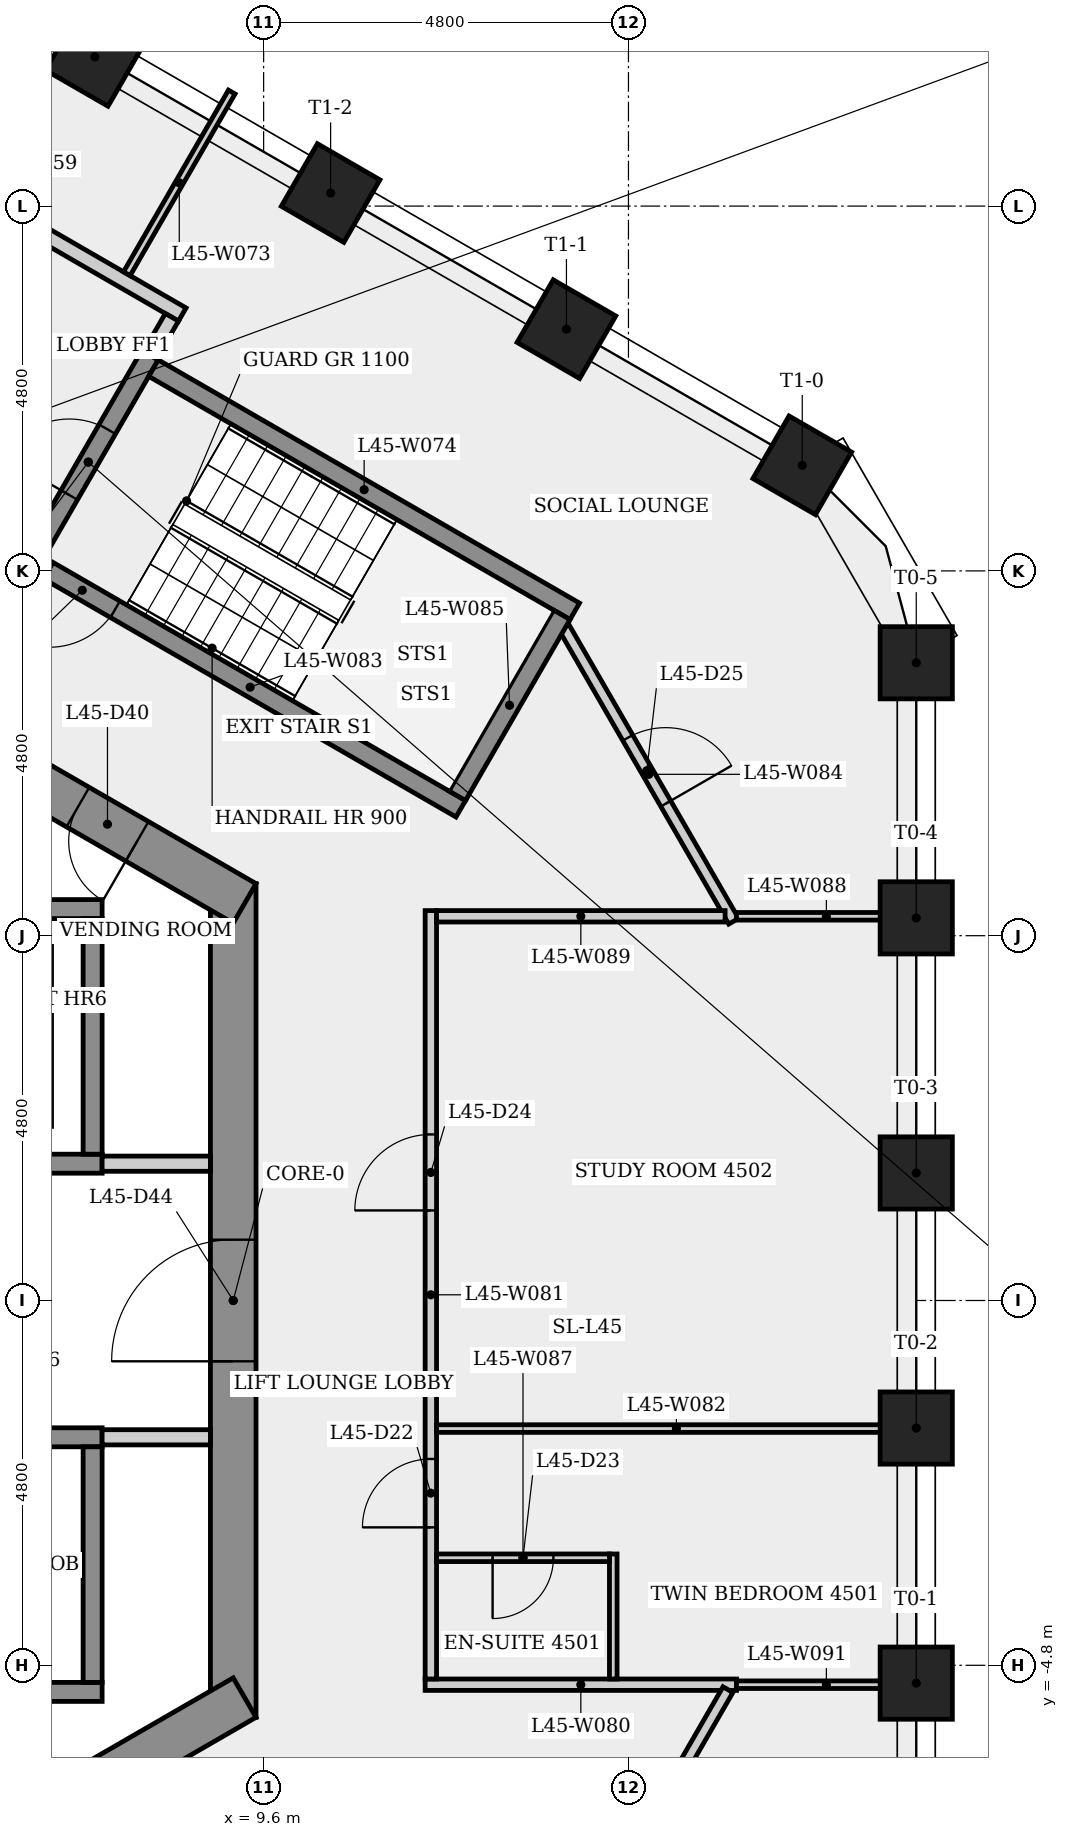
"""IFC4 building model, lengths in metres.
Left out: names, types, materials, properties, quantities, classifications, styles, units other than length and angle.
Written with IfcOpenShell. Run it as: python <this file> out.ifc"""

import sys

from ifc_helpers import new_model, si_unit, direction, frame, frame_2d, origin, origin_2d, place, context, subcontext, project, spatial, rectangle, extrude, element, fill, save


model = new_model("IFC4")
c1 = context("Model", 3, precision=1e-05, world=origin(), true_north=direction((0.0, 1.0)))
c2 = subcontext(c1, "Body", "Model", "MODEL_VIEW")
j1 = project(units=[si_unit("LENGTHUNIT", "METRE"), si_unit("PLANEANGLEUNIT", "RADIAN")], contexts=[c1])
p1 = place(None, origin())
s1 = spatial("IfcSite", under=j1, at=p1, CompositionType="ELEMENT")
p2 = place(p1, origin())
s2 = spatial("IfcBuilding", under=s1, at=p2, CompositionType="ELEMENT")
p3 = place(p2, frame((0.0, 0.0, 169.7)))
s3 = spatial("IfcBuildingStorey", under=s2, at=p3, CompositionType="ELEMENT", Elevation=169.7)
p4 = place(p3, frame((9.2, -5.485, 0.0), z_axis=(0.0, 0.0, 1.0), x_axis=(0.0, 1.0, 0.0)))
e1 = element("IfcWall", 1, at=p4, inside=s3, PredefinedType="SHEAR", context=c2, shape_type="SweptSolid", body=[
    extrude(rectangle(XDim=10.97, YDim=0.6, at=frame_2d((5.485, 0.0))), origin(), (0.0, 0.0, 1.0), 3.4),
])
p5 = place(p4, frame((4.685, 0.0, 0.0)))
e2 = element("IfcOpeningElement", 2, at=p5, cuts=e1, PredefinedType="OPENING", context=c2, shape_type="SweptSolid", body=[
    extrude(rectangle(XDim=1.6, YDim=2.1, at=frame_2d((0.8, 1.05))), frame((0.0, 0.31, 0.0), z_axis=(0.0, -1.0, 0.0), x_axis=(1.0, 0.0, 0.0)), (0.0, 0.0, 1.0), 0.62),
])
p6 = place(p3, frame((9.35, 5.225, 0.0), z_axis=(0.0, 0.0, 1.0), x_axis=(-0.866023993627, 0.500002442456, 0.0)))
e3 = element("IfcWall", 3, at=p6, inside=s3, PredefinedType="SHEAR", context=c2, shape_type="SweptSolid", body=[
    extrude(rectangle(XDim=10.97, YDim=0.6, at=frame_2d((5.485, 0.0))), origin(), (0.0, 0.0, 1.0), 3.4),
])
p7 = place(p6, frame((8.442, 0.0, 0.0)))
e4 = element("IfcOpeningElement", 4, at=p7, cuts=e3, PredefinedType="OPENING", context=c2, shape_type="SweptSolid", body=[
    extrude(rectangle(XDim=0.9, YDim=2.1, at=frame_2d((0.45, 1.05))), frame((0.0, 0.31, 0.0), z_axis=(0.0, -1.0, 0.0), x_axis=(1.0, 0.0, 0.0)), (0.0, 0.0, 1.0), 0.62),
])
p8 = place(p6, frame((1.634, 0.0, 0.0)))
e5 = element("IfcOpeningElement", 5, at=p8, cuts=e3, PredefinedType="OPENING", context=c2, shape_type="SweptSolid", body=[
    extrude(rectangle(XDim=0.9, YDim=2.1, at=frame_2d((0.45, 1.05))), frame((0.0, 0.31, 0.0), z_axis=(0.0, -1.0, 0.0), x_axis=(1.0, 0.0, 0.0)), (0.0, 0.0, 1.0), 0.62),
])
p9 = place(p3, frame((-0.15, -10.71, 0.0), z_axis=(0.0, 0.0, 1.0), x_axis=(0.866023993627, 0.500002442456, 0.0)))
e6 = element("IfcWall", 6, at=p9, inside=s3, PredefinedType="SHEAR", context=c2, shape_type="SweptSolid", body=[
    extrude(rectangle(XDim=10.97, YDim=0.6, at=frame_2d((5.485, 0.0))), origin(), (0.0, 0.0, 1.0), 3.4),
])
p10 = place(p9, frame((7.281, 0.0, 0.0)))
e7 = element("IfcOpeningElement", 7, at=p10, cuts=e6, PredefinedType="OPENING", context=c2, shape_type="SweptSolid", body=[
    extrude(rectangle(XDim=0.9, YDim=2.1, at=frame_2d((0.45, 1.05))), frame((0.0, 0.31, 0.0), z_axis=(0.0, -1.0, 0.0), x_axis=(1.0, 0.0, 0.0)), (0.0, 0.0, 1.0), 0.62),
])
for number, where, z_axis, x_axis in (
    (8, (18.187, -5.035, 0.0), (0.0, 0.0, 1.0), (1.0, 0.0, 0.0)),
    (9, (18.187, -1.678, 0.0), (0.0, 0.0, 1.0), (1.0, 0.0, 0.0)),
    (10, (18.187, 1.678, 0.0), (0.0, 0.0, 1.0), (1.0, 0.0, 0.0)),
    (11, (18.187, 5.035, 0.0), (0.0, 0.0, 1.0), (1.0, 0.0, 0.0)),
    (12, (18.187, 8.391, 0.0), (0.0, 0.0, 1.0), (1.0, 0.0, 0.0)),
    (13, (16.687, 10.989, 0.0), (0.0, 0.0, 1.0), (0.5, 0.866, 0.0)),
    (14, (13.584, 12.781, 0.0), (0.0, 0.0, 1.0), (0.5, 0.866, 0.0)),
    (15, (10.481, 14.572, 0.0), (0.0, 0.0, 1.0), (0.5, 0.866, 0.0)),
    (16, (7.379, 16.363, 0.0), (0.0, 0.0, 1.0), (0.5, 0.866, 0.0)),
):
    element("IfcColumn", number, at=place(p3, frame(where, z_axis=z_axis, x_axis=x_axis)), inside=s3, PredefinedType="COLUMN", context=c2, shape_type="SweptSolid", body=[
        extrude(rectangle(XDim=0.95, YDim=0.95, at=origin_2d()), origin(), (0.0, 0.0, 1.0), 3.4),
    ])
p11 = place(p3, frame((-7.475, 1.8, 0.0), z_axis=(0.0, 0.0, 1.0), x_axis=(1.0, 0.0, 0.0)))
e17 = element("IfcWall", 17, at=p11, inside=s3, PredefinedType="SHEAR", context=c2, shape_type="SweptSolid", body=[
    extrude(rectangle(XDim=14.95, YDim=0.25, at=frame_2d((7.475, 0.0))), origin(), (0.0, 0.0, 1.0), 3.05),
])
p12 = place(p11, frame((0.8, 0.0, 0.0)))
e18 = element("IfcOpeningElement", 18, at=p12, cuts=e17, PredefinedType="OPENING", context=c2, shape_type="SweptSolid", body=[
    extrude(rectangle(XDim=1.1, YDim=2.1, at=frame_2d((0.55, 1.05))), frame((0.0, 0.135, 0.0), z_axis=(0.0, -1.0, 0.0), x_axis=(1.0, 0.0, 0.0)), (0.0, 0.0, 1.0), 0.27),
])
p13 = place(p11, frame((3.25, 0.0, 0.0)))
e19 = element("IfcOpeningElement", 19, at=p13, cuts=e17, PredefinedType="OPENING", context=c2, shape_type="SweptSolid", body=[
    extrude(rectangle(XDim=1.1, YDim=2.1, at=frame_2d((0.55, 1.05))), frame((0.0, 0.135, 0.0), z_axis=(0.0, -1.0, 0.0), x_axis=(1.0, 0.0, 0.0)), (0.0, 0.0, 1.0), 0.27),
])
p14 = place(p11, frame((5.7, 0.0, 0.0)))
e20 = element("IfcOpeningElement", 20, at=p14, cuts=e17, PredefinedType="OPENING", context=c2, shape_type="SweptSolid", body=[
    extrude(rectangle(XDim=1.1, YDim=2.1, at=frame_2d((0.55, 1.05))), frame((0.0, 0.135, 0.0), z_axis=(0.0, -1.0, 0.0), x_axis=(1.0, 0.0, 0.0)), (0.0, 0.0, 1.0), 0.27),
])
p15 = place(p11, frame((8.15, 0.0, 0.0)))
e21 = element("IfcOpeningElement", 21, at=p15, cuts=e17, PredefinedType="OPENING", context=c2, shape_type="SweptSolid", body=[
    extrude(rectangle(XDim=1.1, YDim=2.1, at=frame_2d((0.55, 1.05))), frame((0.0, 0.135, 0.0), z_axis=(0.0, -1.0, 0.0), x_axis=(1.0, 0.0, 0.0)), (0.0, 0.0, 1.0), 0.27),
])
p16 = place(p11, frame((10.6, 0.0, 0.0)))
e22 = element("IfcOpeningElement", 22, at=p16, cuts=e17, PredefinedType="OPENING", context=c2, shape_type="SweptSolid", body=[
    extrude(rectangle(XDim=1.1, YDim=2.1, at=frame_2d((0.55, 1.05))), frame((0.0, 0.135, 0.0), z_axis=(0.0, -1.0, 0.0), x_axis=(1.0, 0.0, 0.0)), (0.0, 0.0, 1.0), 0.27),
])
p17 = place(p11, frame((13.05, 0.0, 0.0)))
e23 = element("IfcOpeningElement", 23, at=p17, cuts=e17, PredefinedType="OPENING", context=c2, shape_type="SweptSolid", body=[
    extrude(rectangle(XDim=1.1, YDim=2.1, at=frame_2d((0.55, 1.05))), frame((0.0, 0.135, 0.0), z_axis=(0.0, -1.0, 0.0), x_axis=(1.0, 0.0, 0.0)), (0.0, 0.0, 1.0), 0.27),
])
p18 = place(p3, frame((-7.225, 5.15, 0.0), z_axis=(0.0, 0.0, 1.0), x_axis=(1.0, 0.0, 0.0)))
e24 = element("IfcWall", 24, at=p18, inside=s3, PredefinedType="SHEAR", context=c2, shape_type="SweptSolid", body=[
    extrude(rectangle(XDim=14.7, YDim=0.25, at=frame_2d((7.35, 0.0))), origin(), (0.0, 0.0, 1.0), 3.05),
])
p19 = place(p3, frame((4.459, 15.323, 0.0), z_axis=(0.0, 0.0, 1.0), x_axis=(0.866016039709, -0.500016218704, 0.0)))
e25 = element("IfcWall", 25, at=p19, inside=s3, PredefinedType="PARTITIONING", context=c2, shape_type="SweptSolid", body=[
    extrude(rectangle(XDim=4.7, YDim=0.2, at=frame_2d((2.35, 0.0))), origin(), (0.0, 0.0, 1.0), 3.05),
])
p20 = place(p3, frame((2.575, -5.15, 0.0), z_axis=(0.0, 0.0, 1.0), x_axis=(1.0, 0.0, 0.0)))
e26 = element("IfcWall", 26, at=p20, inside=s3, PredefinedType="SHEAR", context=c2, shape_type="SweptSolid", body=[
    extrude(rectangle(XDim=4.9, YDim=0.25, at=frame_2d((2.45, 0.0))), origin(), (0.0, 0.0, 1.0), 3.05),
])
p21 = place(p3, frame((2.575, -1.8, 0.0), z_axis=(0.0, 0.0, 1.0), x_axis=(1.0, 0.0, 0.0)))
e27 = element("IfcWall", 27, at=p21, inside=s3, PredefinedType="SHEAR", context=c2, shape_type="SweptSolid", body=[
    extrude(rectangle(XDim=4.9, YDim=0.25, at=frame_2d((2.45, 0.0))), origin(), (0.0, 0.0, 1.0), 3.05),
])
p22 = place(p21, frame((0.597, 0.0, 0.0)))
e28 = element("IfcOpeningElement", 28, at=p22, cuts=e27, PredefinedType="OPENING", context=c2, shape_type="SweptSolid", body=[
    extrude(rectangle(XDim=1.1, YDim=2.1, at=frame_2d((0.55, 1.05))), frame((0.0, 0.135, 0.0), z_axis=(0.0, -1.0, 0.0), x_axis=(1.0, 0.0, 0.0)), (0.0, 0.0, 1.0), 0.27),
])
p23 = place(p3, frame((6.48, 9.624, 0.0), z_axis=(0.0, 0.0, 1.0), x_axis=(0.500017246033, 0.866015446554, 0.0)))
e29 = element("IfcWall", 29, at=p23, inside=s3, PredefinedType="SHEAR", context=c2, shape_type="SweptSolid", body=[
    extrude(rectangle(XDim=3.25, YDim=0.25, at=frame_2d((1.625, 0.0))), origin(), (0.0, 0.0, 1.0), 3.05),
])
p24 = place(p23, frame((1.125, 0.0, 0.0)))
e30 = element("IfcOpeningElement", 30, at=p24, cuts=e29, PredefinedType="OPENING", context=c2, shape_type="SweptSolid", body=[
    extrude(rectangle(XDim=1.0, YDim=2.1, at=frame_2d((0.5, 1.05))), frame((0.0, 0.135, 0.0), z_axis=(0.0, -1.0, 0.0), x_axis=(1.0, 0.0, 0.0)), (0.0, 0.0, 1.0), 0.27),
])
p25 = place(p3, frame((7.475, 1.8, 0.0), z_axis=(0.0, 0.0, 1.0), x_axis=(1.0, 0.0, 0.0)))
e31 = element("IfcWall", 31, at=p25, inside=s3, PredefinedType="PARTITIONING", context=c2, shape_type="SweptSolid", body=[
    extrude(rectangle(XDim=1.425, YDim=0.2, at=frame_2d((0.712, 0.0))), origin(), (0.0, 0.0, 1.0), 3.05),
])
for number, where, z_axis, x_axis in (
    (32, (7.35, -1.925, 0.0), (0.0, 0.0, 1.0), (0.0, -1.0, 0.0)),
    (33, (7.35, 5.025, 0.0), (0.0, 0.0, 1.0), (0.0, -1.0, 0.0)),
):
    element("IfcWall", number, at=place(p3, frame(where, z_axis=z_axis, x_axis=x_axis)), inside=s3, PredefinedType="SHEAR", context=c2, shape_type="SweptSolid", body=[
        extrude(rectangle(XDim=3.1, YDim=0.25, at=frame_2d((1.55, 0.0))), origin(), (0.0, 0.0, 1.0), 3.4),
    ])
p26 = place(p3, frame((7.8, 13.51, 0.0), z_axis=(0.0, 0.0, 1.0), x_axis=(0.500000584575, 0.86602506628, 0.0)))
e34 = element("IfcWall", 34, at=p26, inside=s3, PredefinedType="PARTITIONING", context=c2, shape_type="SweptSolid", body=[
    extrude(rectangle(XDim=2.761, YDim=0.1, at=frame_2d((1.38, 0.0))), origin(), (0.0, 0.0, 1.0), 3.05),
])
p27 = place(p3, frame((8.151, 12.268, 0.0), z_axis=(0.0, 0.0, 1.0), x_axis=(0.866025499775, -0.499999833739, 0.0)))
e35 = element("IfcWall", 35, at=p27, inside=s3, PredefinedType="SHEAR", context=c2, shape_type="SweptSolid", body=[
    extrude(rectangle(XDim=6.4, YDim=0.25, at=frame_2d((3.2, 0.0))), origin(), (0.0, 0.0, 1.0), 3.05),
])
p28 = place(p3, frame((8.393, 12.937, 0.0), z_axis=(0.0, 0.0, 1.0), x_axis=(-0.500065409566, -0.86598763626, 0.0)))
e36 = element("IfcWall", 36, at=p28, inside=s3, PredefinedType="PARTITIONING", context=c2, shape_type="SweptSolid", body=[
    extrude(rectangle(XDim=0.575, YDim=0.2, at=frame_2d((0.288, 0.0))), origin(), (0.0, 0.0, 1.0), 3.05),
])
p29 = place(p3, frame((8.9, -1.8, 0.0), z_axis=(0.0, 0.0, 1.0), x_axis=(-1.0, 0.0, 0.0)))
e37 = element("IfcWall", 37, at=p29, inside=s3, PredefinedType="PARTITIONING", context=c2, shape_type="SweptSolid", body=[
    extrude(rectangle(XDim=1.425, YDim=0.2, at=frame_2d((0.712, 0.0))), origin(), (0.0, 0.0, 1.0), 3.05),
])
p30 = place(p3, frame((11.725, -5.055, 0.0), z_axis=(0.0, 0.0, 1.0), x_axis=(1.0, 0.0, 0.0)))
e38 = element("IfcWall", 38, at=p30, inside=s3, PredefinedType="PARTITIONING", context=c2, shape_type="SweptSolid", body=[
    extrude(rectangle(XDim=4.097, YDim=0.15, at=frame_2d((2.048, 0.0))), origin(), (0.0, 0.0, 1.0), 3.05),
])
p31 = place(p3, frame((11.8, -4.98, 0.0), z_axis=(0.0, 0.0, 1.0), x_axis=(0.0, 1.0, 0.0)))
e39 = element("IfcWall", 39, at=p31, inside=s3, PredefinedType="PARTITIONING", context=c2, shape_type="SweptSolid", body=[
    extrude(rectangle(XDim=10.11, YDim=0.15, at=frame_2d((5.055, 0.0))), origin(), (0.0, 0.0, 1.0), 3.05),
])
p32 = place(p31, frame((1.995, 0.0, 0.0)))
e40 = element("IfcOpeningElement", 40, at=p32, cuts=e39, PredefinedType="OPENING", context=c2, shape_type="SweptSolid", body=[
    extrude(rectangle(XDim=0.9, YDim=2.1, at=frame_2d((0.45, 1.05))), frame((0.0, 0.085, 0.0), z_axis=(0.0, -1.0, 0.0), x_axis=(1.0, 0.0, 0.0)), (0.0, 0.0, 1.0), 0.17),
])
p33 = place(p31, frame((6.165, 0.0, 0.0)))
e41 = element("IfcOpeningElement", 41, at=p33, cuts=e39, PredefinedType="OPENING", context=c2, shape_type="SweptSolid", body=[
    extrude(rectangle(XDim=1.0, YDim=2.1, at=frame_2d((0.5, 1.05))), frame((0.0, 0.085, 0.0), z_axis=(0.0, -1.0, 0.0), x_axis=(1.0, 0.0, 0.0)), (0.0, 0.0, 1.0), 0.17),
])
p34 = place(p3, frame((11.875, -1.685, 0.0), z_axis=(0.0, 0.0, 1.0), x_axis=(1.0, 0.0, 0.0)))
e42 = element("IfcWall", 42, at=p34, inside=s3, PredefinedType="PARTITIONING", context=c2, shape_type="SweptSolid", body=[
    extrude(rectangle(XDim=6.312, YDim=0.1, at=frame_2d((3.156, 0.0))), origin(), (0.0, 0.0, 1.0), 3.05),
])
p35 = place(p3, frame((12.194, 6.47, 0.0), z_axis=(0.0, 0.0, 1.0), x_axis=(-0.866025499775, 0.499999833739, 0.0)))
e43 = element("IfcWall", 43, at=p35, inside=s3, PredefinedType="SHEAR", context=c2, shape_type="SweptSolid", body=[
    extrude(rectangle(XDim=6.4, YDim=0.25, at=frame_2d((3.2, 0.0))), origin(), (0.0, 0.0, 1.0), 3.05),
])
p36 = place(p35, frame((5.25, 0.0, 0.0)))
e44 = element("IfcOpeningElement", 44, at=p36, cuts=e43, PredefinedType="OPENING", context=c2, shape_type="SweptSolid", body=[
    extrude(rectangle(XDim=1.0, YDim=2.1, at=frame_2d((0.5, 1.05))), frame((0.0, 0.135, 0.0), z_axis=(0.0, -1.0, 0.0), x_axis=(1.0, 0.0, 0.0)), (0.0, 0.0, 1.0), 0.27),
])
p37 = place(p3, frame((13.552, 8.856, 0.0), z_axis=(0.0, 0.0, 1.0), x_axis=(0.500027009065, -0.866009809532, 0.0)))
e45 = element("IfcWall", 45, at=p37, inside=s3, PredefinedType="PARTITIONING", context=c2, shape_type="SweptSolid", body=[
    extrude(rectangle(XDim=4.464, YDim=0.15, at=frame_2d((2.232, 0.0))), origin(), (0.0, 0.0, 1.0), 3.05),
])
p38 = place(p37, frame((1.677, 0.0, 0.0)))
e46 = element("IfcOpeningElement", 46, at=p38, cuts=e45, PredefinedType="OPENING", context=c2, shape_type="SweptSolid", body=[
    extrude(rectangle(XDim=1.0, YDim=2.1, at=frame_2d((0.5, 1.05))), frame((0.0, 0.085, 0.0), z_axis=(0.0, -1.0, 0.0), x_axis=(1.0, 0.0, 0.0)), (0.0, 0.0, 1.0), 0.17),
])
p39 = place(p3, frame((12.148, 6.641, 0.0), z_axis=(0.0, 0.0, 1.0), x_axis=(0.500034990121, 0.866005201286, 0.0)))
e47 = element("IfcWall", 47, at=p39, inside=s3, PredefinedType="SHEAR", context=c2, shape_type="SweptSolid", body=[
    extrude(rectangle(XDim=2.75, YDim=0.25, at=frame_2d((1.375, 0.0))), origin(), (0.0, 0.0, 1.0), 3.05),
])
p40 = place(p3, frame((14.2, -4.98, 0.0), z_axis=(0.0, 0.0, 1.0), x_axis=(0.0, 1.0, 0.0)))
e48 = element("IfcWall", 48, at=p40, inside=s3, PredefinedType="PARTITIONING", context=c2, shape_type="SweptSolid", body=[
    extrude(rectangle(XDim=1.645, YDim=0.1, at=frame_2d((0.823, 0.0))), origin(), (0.0, 0.0, 1.0), 3.05),
])
p41 = place(p3, frame((14.15, -3.385, 0.0), z_axis=(0.0, 0.0, 1.0), x_axis=(-1.0, 0.0, 0.0)))
e49 = element("IfcWall", 49, at=p41, inside=s3, PredefinedType="PARTITIONING", context=c2, shape_type="SweptSolid", body=[
    extrude(rectangle(XDim=2.275, YDim=0.1, at=frame_2d((1.137, 0.0))), origin(), (0.0, 0.0, 1.0), 3.05),
])
p42 = place(p41, frame((0.738, 0.0, 0.0)))
e50 = element("IfcOpeningElement", 50, at=p42, cuts=e49, PredefinedType="OPENING", context=c2, shape_type="SweptSolid", body=[
    extrude(rectangle(XDim=0.8, YDim=2.1, at=frame_2d((0.4, 1.05))), frame((0.0, 0.06, 0.0), z_axis=(0.0, -1.0, 0.0), x_axis=(1.0, 0.0, 0.0)), (0.0, 0.0, 1.0), 0.12),
])
p43 = place(p3, frame((15.822, 5.055, 0.0), z_axis=(0.0, 0.0, 1.0), x_axis=(1.0, 0.0, 0.0)))
e51 = element("IfcWall", 51, at=p43, inside=s3, PredefinedType="PARTITIONING", context=c2, shape_type="SweptSolid", body=[
    extrude(rectangle(XDim=2.365, YDim=0.1, at=frame_2d((1.183, 0.0))), origin(), (0.0, 0.0, 1.0), 3.05),
])
p44 = place(p3, frame((15.672, 5.055, 0.0), z_axis=(0.0, 0.0, 1.0), x_axis=(-1.0, 0.0, 0.0)))
e52 = element("IfcWall", 52, at=p44, inside=s3, PredefinedType="PARTITIONING", context=c2, shape_type="SweptSolid", body=[
    extrude(rectangle(XDim=3.797, YDim=0.15, at=frame_2d((1.898, 0.0))), origin(), (0.0, 0.0, 1.0), 3.05),
])
p45 = place(p3, frame((15.709, -5.12, 0.0), z_axis=(0.0, 0.0, 1.0), x_axis=(-0.499989717029, -0.866031340579, 0.0)))
e53 = element("IfcWall", 53, at=p45, inside=s3, PredefinedType="PARTITIONING", context=c2, shape_type="SweptSolid", body=[
    extrude(rectangle(XDim=7.828, YDim=0.15, at=frame_2d((3.914, 0.0))), origin(), (0.0, 0.0, 1.0), 3.05),
])
p46 = place(p45, frame((3.414, 0.0, 0.0)))
e54 = element("IfcOpeningElement", 54, at=p46, cuts=e53, PredefinedType="OPENING", context=c2, shape_type="SweptSolid", body=[
    extrude(rectangle(XDim=1.0, YDim=2.1, at=frame_2d((0.5, 1.05))), frame((0.0, 0.085, 0.0), z_axis=(0.0, -1.0, 0.0), x_axis=(1.0, 0.0, 0.0)), (0.0, 0.0, 1.0), 0.17),
])
p47 = place(p3, frame((18.187, -5.055, 0.0), z_axis=(0.0, 0.0, 1.0), x_axis=(-1.0, 0.0, 0.0)))
e55 = element("IfcWall", 55, at=p47, inside=s3, PredefinedType="PARTITIONING", context=c2, shape_type="SweptSolid", body=[
    extrude(rectangle(XDim=2.365, YDim=0.1, at=frame_2d((1.183, 0.0))), origin(), (0.0, 0.0, 1.0), 3.05),
])
p48 = place(p36, origin())
e56 = element("IfcDoor", 56, at=p48, inside=s3, OperationType="SINGLE_SWING_RIGHT", PredefinedType="DOOR", context=c2, shape_type="SweptSolid", body=[
    extrude(rectangle(XDim=1.0, YDim=2.1, at=frame_2d((0.5, 1.05))), frame((0.0, 0.025, 0.0), z_axis=(0.0, -1.0, 0.0), x_axis=(1.0, 0.0, 0.0)), (0.0, 0.0, 1.0), 0.05),
])
fill(e44, e56)
p49 = place(p24, origin())
e57 = element("IfcDoor", 57, at=p49, inside=s3, OperationType="SINGLE_SWING_LEFT", PredefinedType="DOOR", context=c2, shape_type="SweptSolid", body=[
    extrude(rectangle(XDim=1.0, YDim=2.1, at=frame_2d((0.5, 1.05))), frame((0.0, 0.025, 0.0), z_axis=(0.0, -1.0, 0.0), x_axis=(1.0, 0.0, 0.0)), (0.0, 0.0, 1.0), 0.05),
])
fill(e30, e57)
p50 = place(p32, origin())
e58 = element("IfcDoor", 58, at=p50, inside=s3, OperationType="SINGLE_SWING_LEFT", PredefinedType="DOOR", context=c2, shape_type="SweptSolid", body=[
    extrude(rectangle(XDim=0.9, YDim=2.1, at=frame_2d((0.45, 1.05))), frame((0.0, 0.025, 0.0), z_axis=(0.0, -1.0, 0.0), x_axis=(1.0, 0.0, 0.0)), (0.0, 0.0, 1.0), 0.05),
])
fill(e40, e58)
p51 = place(p42, origin())
e59 = element("IfcDoor", 59, at=p51, inside=s3, OperationType="SINGLE_SWING_RIGHT", PredefinedType="DOOR", context=c2, shape_type="SweptSolid", body=[
    extrude(rectangle(XDim=0.8, YDim=2.1, at=frame_2d((0.4, 1.05))), frame((0.0, 0.025, 0.0), z_axis=(0.0, -1.0, 0.0), x_axis=(1.0, 0.0, 0.0)), (0.0, 0.0, 1.0), 0.05),
])
fill(e50, e59)
p52 = place(p33, origin())
e60 = element("IfcDoor", 60, at=p52, inside=s3, OperationType="SINGLE_SWING_LEFT", PredefinedType="DOOR", context=c2, shape_type="SweptSolid", body=[
    extrude(rectangle(XDim=1.0, YDim=2.1, at=frame_2d((0.5, 1.05))), frame((0.0, 0.025, 0.0), z_axis=(0.0, -1.0, 0.0), x_axis=(1.0, 0.0, 0.0)), (0.0, 0.0, 1.0), 0.05),
])
fill(e41, e60)
p53 = place(p38, origin())
e61 = element("IfcDoor", 61, at=p53, inside=s3, OperationType="SINGLE_SWING_RIGHT", PredefinedType="DOOR", context=c2, shape_type="SweptSolid", body=[
    extrude(rectangle(XDim=1.0, YDim=2.1, at=frame_2d((0.5, 1.05))), frame((0.0, 0.025, 0.0), z_axis=(0.0, -1.0, 0.0), x_axis=(1.0, 0.0, 0.0)), (0.0, 0.0, 1.0), 0.05),
])
fill(e46, e61)
p54 = place(p8, origin())
e62 = element("IfcDoor", 62, at=p54, inside=s3, OperationType="SINGLE_SWING_LEFT", PredefinedType="DOOR", context=c2, shape_type="SweptSolid", body=[
    extrude(rectangle(XDim=0.9, YDim=2.1, at=frame_2d((0.45, 1.05))), frame((0.0, 0.025, 0.0), z_axis=(0.0, -1.0, 0.0), x_axis=(1.0, 0.0, 0.0)), (0.0, 0.0, 1.0), 0.05),
])
fill(e5, e62)
p55 = place(p5, origin())
e63 = element("IfcDoor", 63, at=p55, inside=s3, OperationType="SINGLE_SWING_LEFT", PredefinedType="DOOR", context=c2, shape_type="SweptSolid", body=[
    extrude(rectangle(XDim=1.6, YDim=2.1, at=frame_2d((0.8, 1.05))), frame((0.0, 0.025, 0.0), z_axis=(0.0, -1.0, 0.0), x_axis=(1.0, 0.0, 0.0)), (0.0, 0.0, 1.0), 0.05),
])
fill(e2, e63)
save(model, sys.argv[1])
